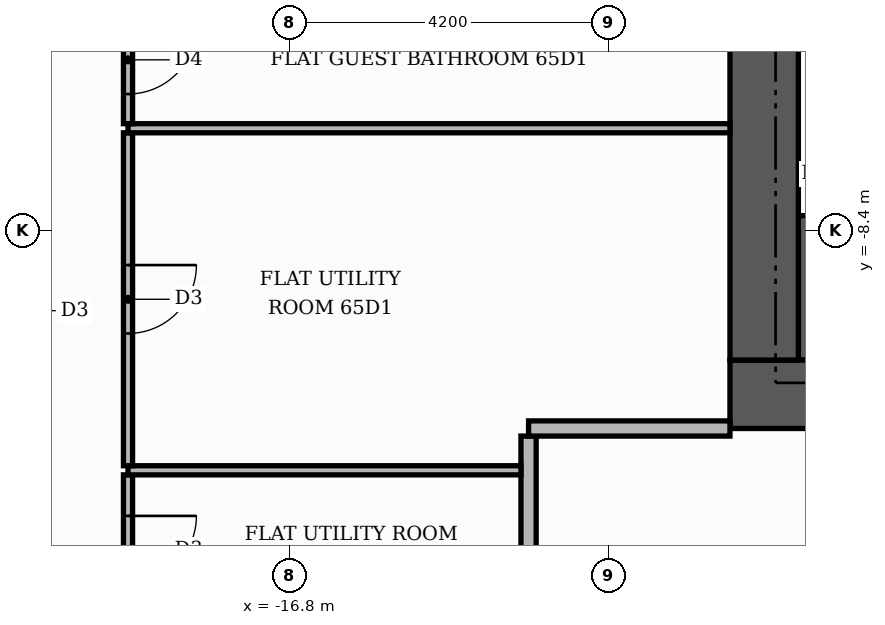
"""IFC4 building model, lengths in metres.
Left out: names, types, materials, properties, quantities, classifications, styles, units other than length and angle.
Written with IfcOpenShell. Run it as: python <this file> out.ifc"""

import sys

from ifc_helpers import new_model, si_unit, direction, frame, frame_2d, origin, place, context, subcontext, project, spatial, rectangle, extrude, element, fill, save


model = new_model("IFC4")
c1 = context("Model", 3, precision=1e-05, world=origin(), true_north=direction((0.0, 1.0)))
c2 = subcontext(c1, "Body", "Model", "MODEL_VIEW")
j1 = project(units=[si_unit("LENGTHUNIT", "METRE"), si_unit("PLANEANGLEUNIT", "RADIAN")], contexts=[c1])
p1 = place(None, origin())
s1 = spatial("IfcSite", under=j1, at=p1, CompositionType="ELEMENT")
p2 = place(p1, origin())
s2 = spatial("IfcBuilding", under=s1, at=p2, CompositionType="ELEMENT")
p3 = place(p2, frame((0.0, 0.0, 271.8)))
s3 = spatial("IfcBuildingStorey", under=s2, at=p3, CompositionType="ELEMENT", Elevation=271.8)
p4 = place(p3, frame((-10.1, -9.15, 0.0), z_axis=(0.0, 0.0, 1.0), x_axis=(1.0, 0.0, 0.0)))
e1 = element("IfcWall", 1, at=p4, inside=s3, PredefinedType="SHEAR", context=c2, shape_type="SweptSolid", body=[
    extrude(rectangle(XDim=4.6, YDim=1.9, at=frame_2d((2.3, 0.0))), origin(), (0.0, 0.0, 1.0), 3.48),
])
p5 = place(p3, frame((-11.0, -10.55, 0.0), z_axis=(0.0, 0.0, 1.0), x_axis=(1.0, 0.0, 0.0)))
e2 = element("IfcWall", 2, at=p5, inside=s3, PredefinedType="SHEAR", context=c2, shape_type="SweptSolid", body=[
    extrude(rectangle(XDim=22.0, YDim=0.9, at=frame_2d((11.0, 0.0))), origin(), (0.0, 0.0, 1.0), 3.48),
])
p6 = place(p5, frame((7.4, 0.0, 0.0)))
e3 = element("IfcOpeningElement", 3, at=p6, cuts=e2, PredefinedType="OPENING", context=c2, shape_type="SweptSolid", body=[
    extrude(rectangle(XDim=1.8, YDim=2.2, at=frame_2d((0.9, 1.1))), frame((0.0, 0.46, 0.0), z_axis=(0.0, -1.0, 0.0), x_axis=(1.0, 0.0, 0.0)), (0.0, 0.0, 1.0), 0.92),
])
p7 = place(p3, frame((-10.55, -10.1, 0.0), z_axis=(0.0, 0.0, 1.0), x_axis=(0.0, 1.0, 0.0)))
e4 = element("IfcWall", 4, at=p7, inside=s3, PredefinedType="SHEAR", context=c2, shape_type="SweptSolid", body=[
    extrude(rectangle(XDim=20.2, YDim=0.9, at=frame_2d((10.1, 0.0))), origin(), (0.0, 0.0, 1.0), 3.48),
])
p8 = place(p3, frame((-18.92, -13.55, 0.0), z_axis=(0.0, 0.0, 1.0), x_axis=(0.0, 1.0, 0.0)))
e5 = element("IfcWall", 5, at=p8, inside=s3, PredefinedType="PARTITIONING", context=c2, shape_type="SweptSolid", body=[
    extrude(rectangle(XDim=1.94, YDim=0.12, at=frame_2d((0.97, 0.0))), origin(), (0.0, 0.0, 1.0), 3.48),
])
p9 = place(p8, frame((0.5, 0.0, 0.0)))
e6 = element("IfcOpeningElement", 6, at=p9, cuts=e5, PredefinedType="OPENING", context=c2, shape_type="SweptSolid", body=[
    extrude(rectangle(XDim=0.9, YDim=2.1, at=frame_2d((0.45, 1.05))), frame((0.0, 0.07, 0.0), z_axis=(0.0, -1.0, 0.0), x_axis=(1.0, 0.0, 0.0)), (0.0, 0.0, 1.0), 0.14),
])
p10 = place(p3, frame((-13.65, -13.55, 0.0), z_axis=(0.0, 0.0, 1.0), x_axis=(0.0, 1.0, 0.0)))
e7 = element("IfcWall", 7, at=p10, inside=s3, PredefinedType="PARTITIONING", context=c2, shape_type="SweptSolid", body=[
    extrude(rectangle(XDim=2.45, YDim=0.2, at=frame_2d((1.225, 0.0))), origin(), (0.0, 0.0, 1.0), 3.48),
])
p11 = place(p3, frame((-18.92, -11.55, 0.0), z_axis=(0.0, 0.0, 1.0), x_axis=(1.0, 0.0, 0.0)))
e8 = element("IfcWall", 8, at=p11, inside=s3, PredefinedType="PARTITIONING", context=c2, shape_type="SweptSolid", body=[
    extrude(rectangle(XDim=5.17, YDim=0.12, at=frame_2d((2.585, 0.0))), origin(), (0.0, 0.0, 1.0), 3.48),
])
p12 = place(p3, frame((-18.92, -11.49, 0.0), z_axis=(0.0, 0.0, 1.0), x_axis=(0.0, 1.0, 0.0)))
e9 = element("IfcWall", 9, at=p12, inside=s3, PredefinedType="PARTITIONING", context=c2, shape_type="SweptSolid", body=[
    extrude(rectangle(XDim=4.38, YDim=0.12, at=frame_2d((2.19, 0.0))), origin(), (0.0, 0.0, 1.0), 3.48),
])
p13 = place(p12, frame((1.74, 0.0, 0.0)))
e10 = element("IfcOpeningElement", 10, at=p13, cuts=e9, PredefinedType="OPENING", context=c2, shape_type="SweptSolid", body=[
    extrude(rectangle(XDim=0.9, YDim=2.1, at=frame_2d((0.45, 1.05))), frame((0.0, 0.07, 0.0), z_axis=(0.0, -1.0, 0.0), x_axis=(1.0, 0.0, 0.0)), (0.0, 0.0, 1.0), 0.14),
])
p14 = place(p3, frame((-13.65, -11.0, 0.0), z_axis=(0.0, 0.0, 1.0), x_axis=(1.0, 0.0, 0.0)))
e11 = element("IfcWall", 11, at=p14, inside=s3, PredefinedType="PARTITIONING", context=c2, shape_type="SweptSolid", body=[
    extrude(rectangle(XDim=2.65, YDim=0.2, at=frame_2d((1.325, 0.0))), origin(), (0.0, 0.0, 1.0), 3.48),
])
p15 = place(p3, frame((-18.92, -7.05, 0.0), z_axis=(0.0, 0.0, 1.0), x_axis=(1.0, 0.0, 0.0)))
e12 = element("IfcWall", 12, at=p15, inside=s3, PredefinedType="PARTITIONING", context=c2, shape_type="SweptSolid", body=[
    extrude(rectangle(XDim=7.92, YDim=0.12, at=frame_2d((3.96, 0.0))), origin(), (0.0, 0.0, 1.0), 3.48),
])
p16 = place(p3, frame((-18.92, -6.99, 0.0), z_axis=(0.0, 0.0, 1.0), x_axis=(0.0, 1.0, 0.0)))
e13 = element("IfcWall", 13, at=p16, inside=s3, PredefinedType="PARTITIONING", context=c2, shape_type="SweptSolid", body=[
    extrude(rectangle(XDim=1.68, YDim=0.12, at=frame_2d((0.84, 0.0))), origin(), (0.0, 0.0, 1.0), 3.48),
])
p17 = place(p16, frame((0.39, 0.0, 0.0)))
e14 = element("IfcOpeningElement", 14, at=p17, cuts=e13, PredefinedType="OPENING", context=c2, shape_type="SweptSolid", body=[
    extrude(rectangle(XDim=0.9, YDim=2.1, at=frame_2d((0.45, 1.05))), frame((0.0, 0.07, 0.0), z_axis=(0.0, -1.0, 0.0), x_axis=(1.0, 0.0, 0.0)), (0.0, 0.0, 1.0), 0.14),
])
p18 = place(p17, frame((0.9, 0.0, 0.0), z_axis=(0.0, 0.0, 1.0), x_axis=(-1.0, 0.0, 0.0)))
e15 = element("IfcDoor", 15, at=p18, inside=s3, OperationType="SINGLE_SWING_RIGHT", PredefinedType="DOOR", context=c2, shape_type="SweptSolid", body=[
    extrude(rectangle(XDim=0.9, YDim=2.1, at=frame_2d((0.45, 1.05))), frame((0.0, 0.025, 0.0), z_axis=(0.0, -1.0, 0.0), x_axis=(1.0, 0.0, 0.0)), (0.0, 0.0, 1.0), 0.05),
])
fill(e14, e15)
p19 = place(p13, frame((0.9, 0.0, 0.0), z_axis=(0.0, 0.0, 1.0), x_axis=(-1.0, 0.0, 0.0)))
e16 = element("IfcDoor", 16, at=p19, inside=s3, OperationType="SINGLE_SWING_RIGHT", PredefinedType="DOOR", context=c2, shape_type="SweptSolid", body=[
    extrude(rectangle(XDim=0.9, YDim=2.1, at=frame_2d((0.45, 1.05))), frame((0.0, 0.025, 0.0), z_axis=(0.0, -1.0, 0.0), x_axis=(1.0, 0.0, 0.0)), (0.0, 0.0, 1.0), 0.05),
])
fill(e10, e16)
p20 = place(p9, frame((0.9, 0.0, 0.0), z_axis=(0.0, 0.0, 1.0), x_axis=(-1.0, 0.0, 0.0)))
e17 = element("IfcDoor", 17, at=p20, inside=s3, OperationType="SINGLE_SWING_RIGHT", PredefinedType="DOOR", context=c2, shape_type="SweptSolid", body=[
    extrude(rectangle(XDim=0.9, YDim=2.1, at=frame_2d((0.45, 1.05))), frame((0.0, 0.025, 0.0), z_axis=(0.0, -1.0, 0.0), x_axis=(1.0, 0.0, 0.0)), (0.0, 0.0, 1.0), 0.05),
])
fill(e6, e17)
save(model, sys.argv[1])
